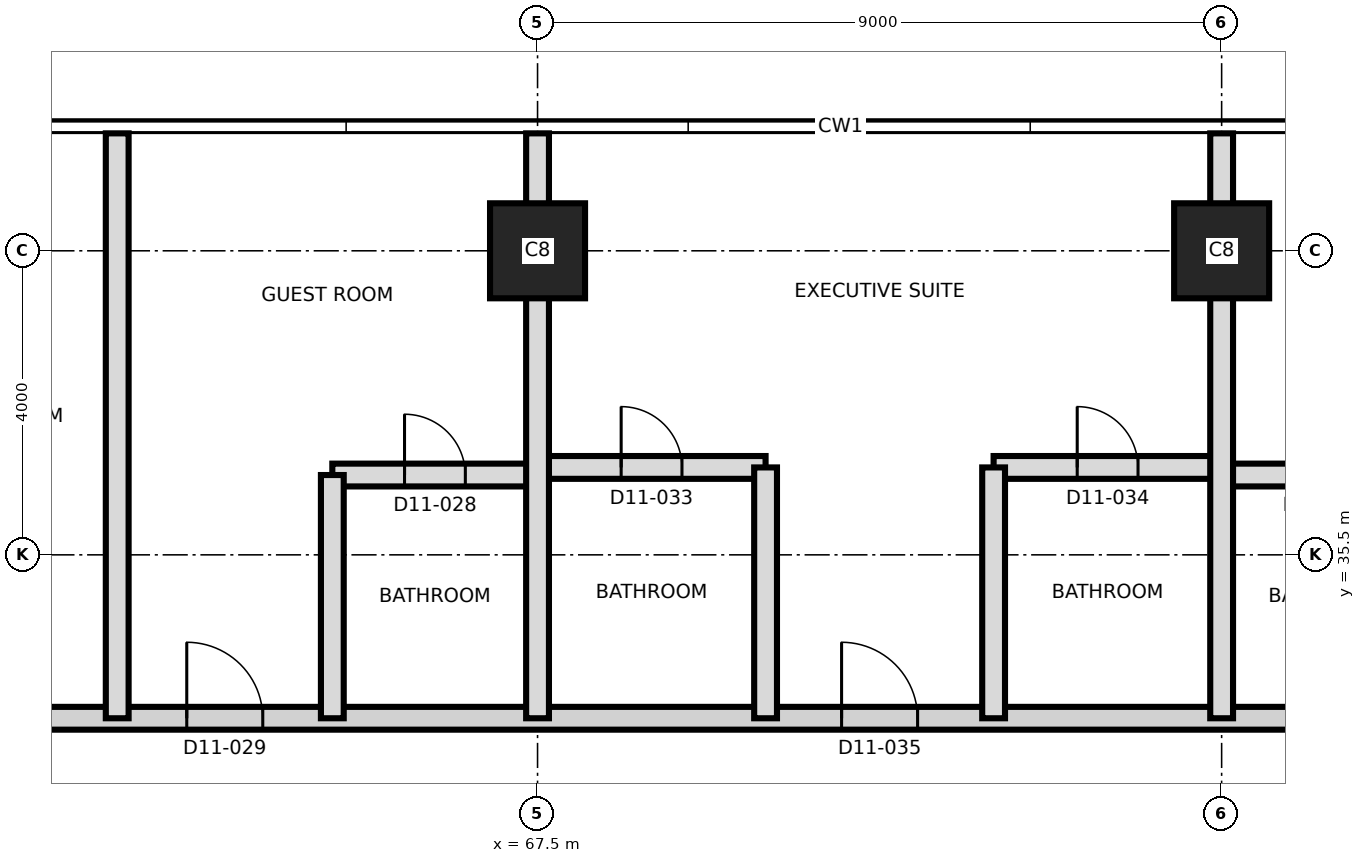
"""IFC4 building model, lengths in metres.
Left out: names, types, materials, properties, quantities, classifications, styles, units other than length and angle.
Written with IfcOpenShell. Run it as: python <this file> out.ifc"""

import sys

from ifc_helpers import new_model, si_unit, direction, frame, frame_2d, origin, origin_2d, place, context, subcontext, project, spatial, rectangle, extrude, element, fill, save


model = new_model("IFC4")
c1 = context("Model", 3, precision=1e-05, world=origin(), true_north=direction((0.0, 1.0)))
c2 = subcontext(c1, "Body", "Model", "MODEL_VIEW")
j1 = project(units=[si_unit("LENGTHUNIT", "METRE"), si_unit("PLANEANGLEUNIT", "RADIAN")], contexts=[c1])
p1 = place(None, origin())
s1 = spatial("IfcSite", under=j1, at=p1, CompositionType="ELEMENT")
p2 = place(p1, origin())
s2 = spatial("IfcBuilding", under=s1, at=p2, CompositionType="ELEMENT")
p3 = place(p2, frame((0.0, 0.0, 131.5)))
s3 = spatial("IfcBuildingStorey", under=s2, at=p3, CompositionType="ELEMENT", Elevation=131.5)
for number, where, z_axis, x_axis in (
    (1, (67.5, 39.5, 0.0), (0.0, 0.0, 1.0), (1.0, 0.0, 0.0)),
    (2, (76.5, 39.5, 0.0), (0.0, 0.0, 1.0), (1.0, 0.0, 0.0)),
):
    element("IfcColumn", number, at=place(p3, frame(where, z_axis=z_axis, x_axis=x_axis)), inside=s3, PredefinedType="COLUMN", context=c2, shape_type="SweptSolid", body=[
        extrude(rectangle(XDim=1.25, YDim=1.25, at=origin_2d()), origin(), (0.0, 0.0, 1.0), 3.7),
    ])
p4 = place(p3, frame((58.8, 33.35, 0.0), z_axis=(0.0, 0.0, 1.0), x_axis=(1.0, 0.0, 0.0)))
e3 = element("IfcWall", 3, at=p4, inside=s3, PredefinedType="PARTITIONING", context=c2, shape_type="SweptSolid", body=[
    extrude(rectangle(XDim=26.53, YDim=0.3, at=frame_2d((13.265, 0.0))), origin(), (0.0, 0.0, 1.0), 3.4),
])
p5 = place(p4, frame((0.835, 0.0, 0.0)))
e4 = element("IfcOpeningElement", 4, at=p5, cuts=e3, PredefinedType="OPENING", context=c2, shape_type="SweptSolid", body=[
    extrude(rectangle(XDim=1.2, YDim=2.1, at=frame_2d((0.6, 1.05))), frame((0.0, 0.16, 0.0), z_axis=(0.0, -1.0, 0.0), x_axis=(1.0, 0.0, 0.0)), (0.0, 0.0, 1.0), 0.32),
])
p6 = place(p4, frame((4.085, 0.0, 0.0)))
e5 = element("IfcOpeningElement", 5, at=p6, cuts=e3, PredefinedType="OPENING", context=c2, shape_type="SweptSolid", body=[
    extrude(rectangle(XDim=1.0, YDim=2.1, at=frame_2d((0.5, 1.05))), frame((0.0, 0.16, 0.0), z_axis=(0.0, -1.0, 0.0), x_axis=(1.0, 0.0, 0.0)), (0.0, 0.0, 1.0), 0.32),
])
p7 = place(p4, frame((12.7, 0.0, 0.0)))
e6 = element("IfcOpeningElement", 6, at=p7, cuts=e3, PredefinedType="OPENING", context=c2, shape_type="SweptSolid", body=[
    extrude(rectangle(XDim=1.0, YDim=2.4, at=frame_2d((0.5, 1.2))), frame((0.0, 0.16, 0.0), z_axis=(0.0, -1.0, 0.0), x_axis=(1.0, 0.0, 0.0)), (0.0, 0.0, 1.0), 0.32),
])
p8 = place(p4, frame((21.115, 0.0, 0.0)))
e7 = element("IfcOpeningElement", 7, at=p8, cuts=e3, PredefinedType="OPENING", context=c2, shape_type="SweptSolid", body=[
    extrude(rectangle(XDim=1.0, YDim=2.1, at=frame_2d((0.5, 1.05))), frame((0.0, 0.16, 0.0), z_axis=(0.0, -1.0, 0.0), x_axis=(1.0, 0.0, 0.0)), (0.0, 0.0, 1.0), 0.32),
])
p9 = place(p4, frame((24.065, 0.0, 0.0)))
e8 = element("IfcOpeningElement", 8, at=p9, cuts=e3, PredefinedType="OPENING", context=c2, shape_type="SweptSolid", body=[
    extrude(rectangle(XDim=1.4, YDim=2.1, at=frame_2d((0.7, 1.05))), frame((0.0, 0.16, 0.0), z_axis=(0.0, -1.0, 0.0), x_axis=(1.0, 0.0, 0.0)), (0.0, 0.0, 1.0), 0.32),
])
p10 = place(p3, frame((64.8, 36.55, 0.0), z_axis=(0.0, 0.0, 1.0), x_axis=(1.0, 0.0, 0.0)))
e9 = element("IfcWall", 9, at=p10, inside=s3, PredefinedType="PARTITIONING", context=c2, shape_type="SweptSolid", body=[
    extrude(rectangle(XDim=2.7, YDim=0.3, at=frame_2d((1.35, 0.0))), origin(), (0.0, 0.0, 1.0), 3.4),
])
p11 = place(p10, frame((0.95, 0.0, 0.0)))
e10 = element("IfcOpeningElement", 10, at=p11, cuts=e9, PredefinedType="OPENING", context=c2, shape_type="SweptSolid", body=[
    extrude(rectangle(XDim=0.8, YDim=2.1, at=frame_2d((0.4, 1.05))), frame((0.0, 0.16, 0.0), z_axis=(0.0, -1.0, 0.0), x_axis=(1.0, 0.0, 0.0)), (0.0, 0.0, 1.0), 0.32),
])
p12 = place(p3, frame((76.5, 36.55, 0.0), z_axis=(0.0, 0.0, 1.0), x_axis=(1.0, 0.0, 0.0)))
e11 = element("IfcWall", 11, at=p12, inside=s3, PredefinedType="PARTITIONING", context=c2, shape_type="SweptSolid", body=[
    extrude(rectangle(XDim=2.7, YDim=0.3, at=frame_2d((1.35, 0.0))), origin(), (0.0, 0.0, 1.0), 3.4),
])
p13 = place(p12, frame((0.95, 0.0, 0.0)))
e12 = element("IfcOpeningElement", 12, at=p13, cuts=e11, PredefinedType="OPENING", context=c2, shape_type="SweptSolid", body=[
    extrude(rectangle(XDim=0.8, YDim=2.1, at=frame_2d((0.4, 1.05))), frame((0.0, 0.16, 0.0), z_axis=(0.0, -1.0, 0.0), x_axis=(1.0, 0.0, 0.0)), (0.0, 0.0, 1.0), 0.32),
])
p14 = place(p3, frame((67.5, 36.65, 0.0), z_axis=(0.0, 0.0, 1.0), x_axis=(1.0, 0.0, 0.0)))
e13 = element("IfcWall", 13, at=p14, inside=s3, PredefinedType="PARTITIONING", context=c2, shape_type="SweptSolid", body=[
    extrude(rectangle(XDim=3.0, YDim=0.3, at=frame_2d((1.5, 0.0))), origin(), (0.0, 0.0, 1.0), 3.4),
])
p15 = place(p14, frame((1.1, 0.0, 0.0)))
e14 = element("IfcOpeningElement", 14, at=p15, cuts=e13, PredefinedType="OPENING", context=c2, shape_type="SweptSolid", body=[
    extrude(rectangle(XDim=0.8, YDim=2.1, at=frame_2d((0.4, 1.05))), frame((0.0, 0.16, 0.0), z_axis=(0.0, -1.0, 0.0), x_axis=(1.0, 0.0, 0.0)), (0.0, 0.0, 1.0), 0.32),
])
p16 = place(p3, frame((73.5, 36.65, 0.0), z_axis=(0.0, 0.0, 1.0), x_axis=(1.0, 0.0, 0.0)))
e15 = element("IfcWall", 15, at=p16, inside=s3, PredefinedType="PARTITIONING", context=c2, shape_type="SweptSolid", body=[
    extrude(rectangle(XDim=3.0, YDim=0.3, at=frame_2d((1.5, 0.0))), origin(), (0.0, 0.0, 1.0), 3.4),
])
p17 = place(p16, frame((1.1, 0.0, 0.0)))
e16 = element("IfcOpeningElement", 16, at=p17, cuts=e15, PredefinedType="OPENING", context=c2, shape_type="SweptSolid", body=[
    extrude(rectangle(XDim=0.8, YDim=2.1, at=frame_2d((0.4, 1.05))), frame((0.0, 0.16, 0.0), z_axis=(0.0, -1.0, 0.0), x_axis=(1.0, 0.0, 0.0)), (0.0, 0.0, 1.0), 0.32),
])
p18 = place(p3, frame((61.97, 33.35, 0.0), z_axis=(0.0, 0.0, 1.0), x_axis=(0.0, 1.0, 0.0)))
e17 = element("IfcWall", 17, at=p18, inside=s3, PredefinedType="PARTITIONING", context=c2, shape_type="SweptSolid", body=[
    extrude(rectangle(XDim=7.695, YDim=0.3, at=frame_2d((3.847, 0.0))), origin(), (0.0, 0.0, 1.0), 3.35),
])
p19 = place(p3, frame((64.8, 33.35, 0.0), z_axis=(0.0, 0.0, 1.0), x_axis=(0.0, 1.0, 0.0)))
e18 = element("IfcWall", 18, at=p19, inside=s3, PredefinedType="PARTITIONING", context=c2, shape_type="SweptSolid", body=[
    extrude(rectangle(XDim=3.2, YDim=0.3, at=frame_2d((1.6, 0.0))), origin(), (0.0, 0.0, 1.0), 3.4),
])
p20 = place(p3, frame((67.5, 33.35, 0.0), z_axis=(0.0, 0.0, 1.0), x_axis=(0.0, 1.0, 0.0)))
e19 = element("IfcWall", 19, at=p20, inside=s3, PredefinedType="PARTITIONING", context=c2, shape_type="SweptSolid", body=[
    extrude(rectangle(XDim=7.695, YDim=0.3, at=frame_2d((3.847, 0.0))), origin(), (0.0, 0.0, 1.0), 3.35),
])
for number, where, z_axis, x_axis in (
    (20, (70.5, 33.35, 0.0), (0.0, 0.0, 1.0), (0.0, 1.0, 0.0)),
    (21, (73.5, 33.35, 0.0), (0.0, 0.0, 1.0), (0.0, 1.0, 0.0)),
):
    element("IfcWall", number, at=place(p3, frame(where, z_axis=z_axis, x_axis=x_axis)), inside=s3, PredefinedType="PARTITIONING", context=c2, shape_type="SweptSolid", body=[
        extrude(rectangle(XDim=3.3, YDim=0.3, at=frame_2d((1.65, 0.0))), origin(), (0.0, 0.0, 1.0), 3.4),
    ])
p21 = place(p3, frame((76.5, 33.35, 0.0), z_axis=(0.0, 0.0, 1.0), x_axis=(0.0, 1.0, 0.0)))
e22 = element("IfcWall", 22, at=p21, inside=s3, PredefinedType="PARTITIONING", context=c2, shape_type="SweptSolid", body=[
    extrude(rectangle(XDim=7.695, YDim=0.3, at=frame_2d((3.847, 0.0))), origin(), (0.0, 0.0, 1.0), 3.35),
])
p22 = place(p11, origin())
e23 = element("IfcDoor", 23, at=p22, inside=s3, OperationType="SINGLE_SWING_RIGHT", PredefinedType="DOOR", context=c2, shape_type="SweptSolid", body=[
    extrude(rectangle(XDim=0.8, YDim=2.1, at=frame_2d((0.4, 1.05))), frame((0.0, 0.025, 0.0), z_axis=(0.0, -1.0, 0.0), x_axis=(1.0, 0.0, 0.0)), (0.0, 0.0, 1.0), 0.05),
])
fill(e10, e23)
p23 = place(p6, origin())
e24 = element("IfcDoor", 24, at=p23, inside=s3, OperationType="SINGLE_SWING_LEFT", PredefinedType="DOOR", context=c2, shape_type="SweptSolid", body=[
    extrude(rectangle(XDim=1.0, YDim=2.1, at=frame_2d((0.5, 1.05))), frame((0.0, 0.025, 0.0), z_axis=(0.0, -1.0, 0.0), x_axis=(1.0, 0.0, 0.0)), (0.0, 0.0, 1.0), 0.05),
])
fill(e5, e24)
p24 = place(p15, origin())
e25 = element("IfcDoor", 25, at=p24, inside=s3, OperationType="SINGLE_SWING_LEFT", PredefinedType="DOOR", context=c2, shape_type="SweptSolid", body=[
    extrude(rectangle(XDim=0.8, YDim=2.1, at=frame_2d((0.4, 1.05))), frame((0.0, 0.025, 0.0), z_axis=(0.0, -1.0, 0.0), x_axis=(1.0, 0.0, 0.0)), (0.0, 0.0, 1.0), 0.05),
])
fill(e14, e25)
p25 = place(p17, origin())
e26 = element("IfcDoor", 26, at=p25, inside=s3, OperationType="SINGLE_SWING_RIGHT", PredefinedType="DOOR", context=c2, shape_type="SweptSolid", body=[
    extrude(rectangle(XDim=0.8, YDim=2.1, at=frame_2d((0.4, 1.05))), frame((0.0, 0.025, 0.0), z_axis=(0.0, -1.0, 0.0), x_axis=(1.0, 0.0, 0.0)), (0.0, 0.0, 1.0), 0.05),
])
fill(e16, e26)
p26 = place(p7, origin())
e27 = element("IfcDoor", 27, at=p26, inside=s3, OperationType="SINGLE_SWING_LEFT", PredefinedType="DOOR", context=c2, shape_type="SweptSolid", body=[
    extrude(rectangle(XDim=1.0, YDim=2.4, at=frame_2d((0.5, 1.2))), frame((0.0, 0.025, 0.0), z_axis=(0.0, -1.0, 0.0), x_axis=(1.0, 0.0, 0.0)), (0.0, 0.0, 1.0), 0.05),
])
fill(e6, e27)
save(model, sys.argv[1])
